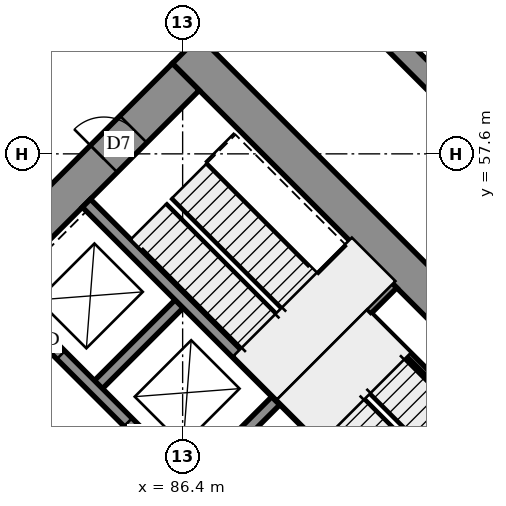
"""IFC4 building model, lengths in metres.
Left out: names, types, materials, properties, quantities, classifications, styles, units other than length and angle.
Written with IfcOpenShell. Run it as: python <this file> out.ifc"""

import sys

from ifc_helpers import new_model, si_unit, direction, frame, frame_2d, origin, place, context, subcontext, project, spatial, polyline, rectangle, outline, extrude, element, fill, save


model = new_model("IFC4")
c1 = context("Model", 3, precision=1e-05, world=origin(), true_north=direction((0.0, 1.0)))
c2 = subcontext(c1, "Body", "Model", "MODEL_VIEW")
j1 = project(units=[si_unit("LENGTHUNIT", "METRE"), si_unit("PLANEANGLEUNIT", "RADIAN")], contexts=[c1])
p1 = place(None, origin())
s1 = spatial("IfcSite", under=j1, at=p1, CompositionType="ELEMENT")
p2 = place(p1, origin())
s2 = spatial("IfcBuilding", under=s1, at=p2, CompositionType="ELEMENT")
p3 = place(p2, origin())
s3 = spatial("IfcBuildingStorey", under=s2, at=p3, CompositionType="ELEMENT", Elevation=0.0)
p4 = place(p3, frame((86.483, 60.333, -0.4), z_axis=(0.0, 0.0, 1.0), x_axis=(0.70710983, -0.7071037324, 0.0)))
e1 = element("IfcWall", 1, at=p4, inside=s3, PredefinedType="SHEAR", context=c2, shape_type="SweptSolid", body=[
    extrude(rectangle(XDim=16.4, YDim=1.0, at=frame_2d((8.2, 0.0))), origin(), (0.0, 0.0, 1.0), 5.3),
])
p5 = place(p4, frame((11.0, 0.0, 0.4)))
e2 = element("IfcOpeningElement", 2, at=p5, cuts=e1, PredefinedType="OPENING", context=c2, shape_type="SweptSolid", body=[
    extrude(rectangle(XDim=0.8, YDim=2.1, at=frame_2d((0.4, 1.05))), frame((0.0, 0.51, 0.0), z_axis=(0.0, -1.0, 0.0), x_axis=(1.0, 0.0, 0.0)), (0.0, 0.0, 1.0), 1.02),
])
p6 = place(p3, frame((76.301, 49.443, -0.4), z_axis=(0.0, 0.0, 1.0), x_axis=(0.7071067812, 0.7071067812, 0.0)))
e3 = element("IfcWall", 3, at=p6, inside=s3, PredefinedType="SHEAR", context=c2, shape_type="SweptSolid", body=[
    extrude(rectangle(XDim=14.4, YDim=1.0, at=frame_2d((7.2, 0.0))), origin(), (0.0, 0.0, 1.0), 5.3),
])
p7 = place(p6, frame((4.55, 0.0, 0.4)))
e4 = element("IfcOpeningElement", 4, at=p7, cuts=e3, PredefinedType="OPENING", context=c2, shape_type="SweptSolid", body=[
    extrude(rectangle(XDim=1.1, YDim=2.1, at=frame_2d((0.55, 1.05))), frame((0.0, 0.51, 0.0), z_axis=(0.0, -1.0, 0.0), x_axis=(1.0, 0.0, 0.0)), (0.0, 0.0, 1.0), 1.02),
])
p8 = place(p6, frame((11.35, 0.0, 0.4)))
e5 = element("IfcOpeningElement", 5, at=p8, cuts=e3, PredefinedType="OPENING", context=c2, shape_type="SweptSolid", body=[
    extrude(rectangle(XDim=1.1, YDim=2.1, at=frame_2d((0.55, 1.05))), frame((0.0, 0.51, 0.0), z_axis=(0.0, -1.0, 0.0), x_axis=(1.0, 0.0, 0.0)), (0.0, 0.0, 1.0), 1.02),
])
p9 = place(p3, frame((84.079, 51.423, 0.0), z_axis=(0.0, 0.0, 1.0), x_axis=(0.7071219326, 0.7070916295, 0.0)))
e6 = element("IfcWall", 6, at=p9, inside=s3, PredefinedType="SOLIDWALL", context=c2, shape_type="SweptSolid", body=[
    extrude(rectangle(XDim=3.3, YDim=0.3, at=frame_2d((1.65, 0.0))), origin(), (0.0, 0.0, 1.0), 5.6),
])
p10 = place(p3, frame((86.625, 48.878, 0.0), z_axis=(0.0, 0.0, 1.0), x_axis=(0.7071067812, 0.7071067812, 0.0)))
e7 = element("IfcWall", 7, at=p10, inside=s3, PredefinedType="SOLIDWALL", context=c2, shape_type="SweptSolid", body=[
    extrude(rectangle(XDim=3.3, YDim=0.3, at=frame_2d((1.65, 0.0))), origin(), (0.0, 0.0, 1.0), 5.6),
])
p11 = place(p3, frame((78.988, 51.423, 0.0), z_axis=(0.0, 0.0, 1.0), x_axis=(0.7071067812, -0.7071067812, 0.0)))
e8 = element("IfcWall", 8, at=p11, inside=s3, PredefinedType="SOLIDWALL", context=c2, shape_type="SweptSolid", body=[
    extrude(rectangle(XDim=14.4, YDim=0.3, at=frame_2d((7.2, 0.0))), origin(), (0.0, 0.0, 1.0), 5.6),
])
p12 = place(p11, frame((1.25, 0.0, 0.0)))
e9 = element("IfcOpeningElement", 9, at=p12, cuts=e8, PredefinedType="OPENING", context=c2, shape_type="SweptSolid", body=[
    extrude(rectangle(XDim=1.1, YDim=2.1, at=frame_2d((0.55, 1.05))), frame((0.0, 0.16, 0.0), z_axis=(0.0, -1.0, 0.0), x_axis=(1.0, 0.0, 0.0)), (0.0, 0.0, 1.0), 0.32),
])
p13 = place(p11, frame((4.85, 0.0, 0.0)))
e10 = element("IfcOpeningElement", 10, at=p13, cuts=e8, PredefinedType="OPENING", context=c2, shape_type="SweptSolid", body=[
    extrude(rectangle(XDim=1.1, YDim=2.1, at=frame_2d((0.55, 1.05))), frame((0.0, 0.16, 0.0), z_axis=(0.0, -1.0, 0.0), x_axis=(1.0, 0.0, 0.0)), (0.0, 0.0, 1.0), 0.32),
])
p14 = place(p11, frame((8.45, 0.0, 0.0)))
e11 = element("IfcOpeningElement", 11, at=p14, cuts=e8, PredefinedType="OPENING", context=c2, shape_type="SweptSolid", body=[
    extrude(rectangle(XDim=1.1, YDim=2.1, at=frame_2d((0.55, 1.05))), frame((0.0, 0.16, 0.0), z_axis=(0.0, -1.0, 0.0), x_axis=(1.0, 0.0, 0.0)), (0.0, 0.0, 1.0), 0.32),
])
p15 = place(p11, frame((12.05, 0.0, 0.0)))
e12 = element("IfcOpeningElement", 12, at=p15, cuts=e8, PredefinedType="OPENING", context=c2, shape_type="SweptSolid", body=[
    extrude(rectangle(XDim=1.1, YDim=2.1, at=frame_2d((0.55, 1.05))), frame((0.0, 0.16, 0.0), z_axis=(0.0, -1.0, 0.0), x_axis=(1.0, 0.0, 0.0)), (0.0, 0.0, 1.0), 0.32),
])
p16 = place(p3, frame((81.534, 53.969, 0.0), z_axis=(0.0, 0.0, 1.0), x_axis=(0.707103309, -0.7071102534, 0.0)))
e13 = element("IfcWall", 13, at=p16, inside=s3, PredefinedType="SOLIDWALL", context=c2, shape_type="SweptSolid", body=[
    extrude(rectangle(XDim=14.4, YDim=0.3, at=frame_2d((7.2, 0.0))), origin(), (0.0, 0.0, 1.0), 5.6),
])
p17 = place(p16, frame((1.25, 0.0, 0.0)))
e14 = element("IfcOpeningElement", 14, at=p17, cuts=e13, PredefinedType="OPENING", context=c2, shape_type="SweptSolid", body=[
    extrude(rectangle(XDim=1.1, YDim=2.1, at=frame_2d((0.55, 1.05))), frame((0.0, 0.16, 0.0), z_axis=(0.0, -1.0, 0.0), x_axis=(1.0, 0.0, 0.0)), (0.0, 0.0, 1.0), 0.32),
])
p18 = place(p16, frame((4.85, 0.0, 0.0)))
e15 = element("IfcOpeningElement", 15, at=p18, cuts=e13, PredefinedType="OPENING", context=c2, shape_type="SweptSolid", body=[
    extrude(rectangle(XDim=1.1, YDim=2.1, at=frame_2d((0.55, 1.05))), frame((0.0, 0.16, 0.0), z_axis=(0.0, -1.0, 0.0), x_axis=(1.0, 0.0, 0.0)), (0.0, 0.0, 1.0), 0.32),
])
p19 = place(p16, frame((8.45, 0.0, 0.0)))
e16 = element("IfcOpeningElement", 16, at=p19, cuts=e13, PredefinedType="OPENING", context=c2, shape_type="SweptSolid", body=[
    extrude(rectangle(XDim=1.1, YDim=2.1, at=frame_2d((0.55, 1.05))), frame((0.0, 0.16, 0.0), z_axis=(0.0, -1.0, 0.0), x_axis=(1.0, 0.0, 0.0)), (0.0, 0.0, 1.0), 0.32),
])
p20 = place(p16, frame((12.05, 0.0, 0.0)))
e17 = element("IfcOpeningElement", 17, at=p20, cuts=e13, PredefinedType="OPENING", context=c2, shape_type="SweptSolid", body=[
    extrude(rectangle(XDim=1.1, YDim=2.1, at=frame_2d((0.55, 1.05))), frame((0.0, 0.16, 0.0), z_axis=(0.0, -1.0, 0.0), x_axis=(1.0, 0.0, 0.0)), (0.0, 0.0, 1.0), 0.32),
])
for number, where, z_axis, x_axis in (
    (18, (83.867, 56.302, 0.0), (0.0, 0.0, 1.0), (0.707, -0.707, 0.0)),
    (19, (88.958, 51.211, 0.0), (0.0, 0.0, 1.0), (0.707, -0.707, 0.0)),
):
    element("IfcWall", number, at=place(p3, frame(where, z_axis=z_axis, x_axis=x_axis)), inside=s3, PredefinedType="SOLIDWALL", context=c2, shape_type="SweptSolid", body=[
        extrude(rectangle(XDim=7.2, YDim=0.3, at=frame_2d((3.6, 0.0))), origin(), (0.0, 0.0, 1.0), 5.6),
    ])
p21 = place(p3, frame((88.958, 51.211, 0.0), z_axis=(0.0, 0.0, 1.0), x_axis=(0.7071067812, 0.7071067812, 0.0)))
e20 = element("IfcWall", 20, at=p21, inside=s3, PredefinedType="SOLIDWALL", context=c2, shape_type="SweptSolid", body=[
    extrude(rectangle(XDim=4.2, YDim=0.3, at=frame_2d((2.1, 0.0))), origin(), (0.0, 0.0, 1.0), 5.6),
])
p22 = place(p3, frame((117.843, 34.665, 0.0), z_axis=(0.0, 0.0, 1.0), x_axis=(-0.7071067812, 0.7071067812, 0.0)))
e21 = element("IfcWall", 21, at=p22, inside=s3, PredefinedType="SOLIDWALL", context=c2, shape_type="SweptSolid", body=[
    extrude(outline(polyline([(-0.275, -0.275), (54.222, -0.275), (53.994, 0.275), (0.275, 0.275), (-0.275, -0.275)])), origin(), (0.0, 0.0, 1.0), 5.6),
])
p23 = place(p22, frame((0.8, 0.0, 0.7)))
e22 = element("IfcOpeningElement", 22, at=p23, cuts=e21, PredefinedType="OPENING", context=c2, shape_type="SweptSolid", body=[
    extrude(rectangle(XDim=1.8, YDim=3.4, at=frame_2d((0.9, 1.7))), frame((0.0, 0.285, 0.0), z_axis=(0.0, -1.0, 0.0), x_axis=(1.0, 0.0, 0.0)), (0.0, 0.0, 1.0), 0.57),
])
p24 = place(p22, frame((4.225, 0.0, 0.7)))
e23 = element("IfcOpeningElement", 23, at=p24, cuts=e21, PredefinedType="OPENING", context=c2, shape_type="SweptSolid", body=[
    extrude(rectangle(XDim=1.8, YDim=3.4, at=frame_2d((0.9, 1.7))), frame((0.0, 0.285, 0.0), z_axis=(0.0, -1.0, 0.0), x_axis=(1.0, 0.0, 0.0)), (0.0, 0.0, 1.0), 0.57),
])
p25 = place(p22, frame((7.825, 0.0, 0.7)))
e24 = element("IfcOpeningElement", 24, at=p25, cuts=e21, PredefinedType="OPENING", context=c2, shape_type="SweptSolid", body=[
    extrude(rectangle(XDim=1.8, YDim=3.4, at=frame_2d((0.9, 1.7))), frame((0.0, 0.285, 0.0), z_axis=(0.0, -1.0, 0.0), x_axis=(1.0, 0.0, 0.0)), (0.0, 0.0, 1.0), 0.57),
])
p26 = place(p22, frame((11.425, 0.0, 0.7)))
e25 = element("IfcOpeningElement", 25, at=p26, cuts=e21, PredefinedType="OPENING", context=c2, shape_type="SweptSolid", body=[
    extrude(rectangle(XDim=1.8, YDim=3.4, at=frame_2d((0.9, 1.7))), frame((0.0, 0.285, 0.0), z_axis=(0.0, -1.0, 0.0), x_axis=(1.0, 0.0, 0.0)), (0.0, 0.0, 1.0), 0.57),
])
p27 = place(p22, frame((15.025, 0.0, 0.7)))
e26 = element("IfcOpeningElement", 26, at=p27, cuts=e21, PredefinedType="OPENING", context=c2, shape_type="SweptSolid", body=[
    extrude(rectangle(XDim=1.8, YDim=3.4, at=frame_2d((0.9, 1.7))), frame((0.0, 0.285, 0.0), z_axis=(0.0, -1.0, 0.0), x_axis=(1.0, 0.0, 0.0)), (0.0, 0.0, 1.0), 0.57),
])
p28 = place(p22, frame((22.225, 0.0, 0.7)))
e27 = element("IfcOpeningElement", 27, at=p28, cuts=e21, PredefinedType="OPENING", context=c2, shape_type="SweptSolid", body=[
    extrude(rectangle(XDim=1.8, YDim=3.4, at=frame_2d((0.9, 1.7))), frame((0.0, 0.285, 0.0), z_axis=(0.0, -1.0, 0.0), x_axis=(1.0, 0.0, 0.0)), (0.0, 0.0, 1.0), 0.57),
])
p29 = place(p22, frame((25.825, 0.0, 0.7)))
e28 = element("IfcOpeningElement", 28, at=p29, cuts=e21, PredefinedType="OPENING", context=c2, shape_type="SweptSolid", body=[
    extrude(rectangle(XDim=1.8, YDim=3.4, at=frame_2d((0.9, 1.7))), frame((0.0, 0.285, 0.0), z_axis=(0.0, -1.0, 0.0), x_axis=(1.0, 0.0, 0.0)), (0.0, 0.0, 1.0), 0.57),
])
p30 = place(p22, frame((29.425, 0.0, 0.7)))
e29 = element("IfcOpeningElement", 29, at=p30, cuts=e21, PredefinedType="OPENING", context=c2, shape_type="SweptSolid", body=[
    extrude(rectangle(XDim=1.8, YDim=3.4, at=frame_2d((0.9, 1.7))), frame((0.0, 0.285, 0.0), z_axis=(0.0, -1.0, 0.0), x_axis=(1.0, 0.0, 0.0)), (0.0, 0.0, 1.0), 0.57),
])
p31 = place(p22, frame((33.025, 0.0, 0.7)))
e30 = element("IfcOpeningElement", 30, at=p31, cuts=e21, PredefinedType="OPENING", context=c2, shape_type="SweptSolid", body=[
    extrude(rectangle(XDim=1.8, YDim=3.4, at=frame_2d((0.9, 1.7))), frame((0.0, 0.285, 0.0), z_axis=(0.0, -1.0, 0.0), x_axis=(1.0, 0.0, 0.0)), (0.0, 0.0, 1.0), 0.57),
])
p32 = place(p22, frame((36.625, 0.0, 0.7)))
e31 = element("IfcOpeningElement", 31, at=p32, cuts=e21, PredefinedType="OPENING", context=c2, shape_type="SweptSolid", body=[
    extrude(rectangle(XDim=1.8, YDim=3.4, at=frame_2d((0.9, 1.7))), frame((0.0, 0.285, 0.0), z_axis=(0.0, -1.0, 0.0), x_axis=(1.0, 0.0, 0.0)), (0.0, 0.0, 1.0), 0.57),
])
p33 = place(p22, frame((40.225, 0.0, 0.7)))
e32 = element("IfcOpeningElement", 32, at=p33, cuts=e21, PredefinedType="OPENING", context=c2, shape_type="SweptSolid", body=[
    extrude(rectangle(XDim=1.8, YDim=3.4, at=frame_2d((0.9, 1.7))), frame((0.0, 0.285, 0.0), z_axis=(0.0, -1.0, 0.0), x_axis=(1.0, 0.0, 0.0)), (0.0, 0.0, 1.0), 0.57),
])
p34 = place(p22, frame((47.425, 0.0, 0.7)))
e33 = element("IfcOpeningElement", 33, at=p34, cuts=e21, PredefinedType="OPENING", context=c2, shape_type="SweptSolid", body=[
    extrude(rectangle(XDim=1.8, YDim=3.4, at=frame_2d((0.9, 1.7))), frame((0.0, 0.285, 0.0), z_axis=(0.0, -1.0, 0.0), x_axis=(1.0, 0.0, 0.0)), (0.0, 0.0, 1.0), 0.57),
])
p35 = place(p22, frame((51.06, 0.0, 0.7)))
e34 = element("IfcOpeningElement", 34, at=p35, cuts=e21, PredefinedType="OPENING", context=c2, shape_type="SweptSolid", body=[
    extrude(rectangle(XDim=1.8, YDim=3.4, at=frame_2d((0.9, 1.7))), frame((0.0, 0.285, 0.0), z_axis=(0.0, -1.0, 0.0), x_axis=(1.0, 0.0, 0.0)), (0.0, 0.0, 1.0), 0.57),
])
p36 = place(p3, frame((91.313, 53.354, 0.0), z_axis=(0.0, 0.0, 1.0), x_axis=(0.7071067812, -0.7071067812, 0.0)))
e35 = element("IfcWall", 35, at=p36, inside=s3, PredefinedType="PARTITIONING", context=c2, shape_type="SweptSolid", body=[
    extrude(rectangle(XDim=5.65, YDim=0.15, at=frame_2d((2.825, 0.0))), origin(), (0.0, 0.0, 1.0), 5.6),
])
p37 = place(p3, frame((77.35, 57.351, 0.0), z_axis=(0.0, 0.0, 1.0), x_axis=(0.7071067812, 0.7071067812, 0.0)))
e36 = element("IfcWall", 36, at=p37, inside=s3, PredefinedType="PARTITIONING", context=c2, shape_type="SweptSolid", body=[
    extrude(rectangle(XDim=12.666, YDim=0.3, at=frame_2d((6.333, 0.0))), origin(), (0.0, 0.0, 1.0), 5.6),
])
p38 = place(p8, origin())
e37 = element("IfcDoor", 37, at=p38, inside=s3, OperationType="SINGLE_SWING_LEFT", PredefinedType="DOOR", context=c2, shape_type="SweptSolid", body=[
    extrude(rectangle(XDim=1.1, YDim=2.1, at=frame_2d((0.55, 1.05))), frame((0.0, 0.025, 0.0), z_axis=(0.0, -1.0, 0.0), x_axis=(1.0, 0.0, 0.0)), (0.0, 0.0, 1.0), 0.05),
])
fill(e5, e37)
p39 = place(p17, origin())
e38 = element("IfcDoor", 38, at=p39, inside=s3, OperationType="SLIDING_TO_LEFT", PredefinedType="DOOR", context=c2, shape_type="SweptSolid", body=[
    extrude(rectangle(XDim=1.1, YDim=2.1, at=frame_2d((0.55, 1.05))), frame((0.0, 0.025, 0.0), z_axis=(0.0, -1.0, 0.0), x_axis=(1.0, 0.0, 0.0)), (0.0, 0.0, 1.0), 0.05),
])
fill(e14, e38)
p40 = place(p18, origin())
e39 = element("IfcDoor", 39, at=p40, inside=s3, OperationType="SLIDING_TO_RIGHT", PredefinedType="DOOR", context=c2, shape_type="SweptSolid", body=[
    extrude(rectangle(XDim=1.1, YDim=2.1, at=frame_2d((0.55, 1.05))), frame((0.0, 0.025, 0.0), z_axis=(0.0, -1.0, 0.0), x_axis=(1.0, 0.0, 0.0)), (0.0, 0.0, 1.0), 0.05),
])
fill(e15, e39)
save(model, sys.argv[1])
